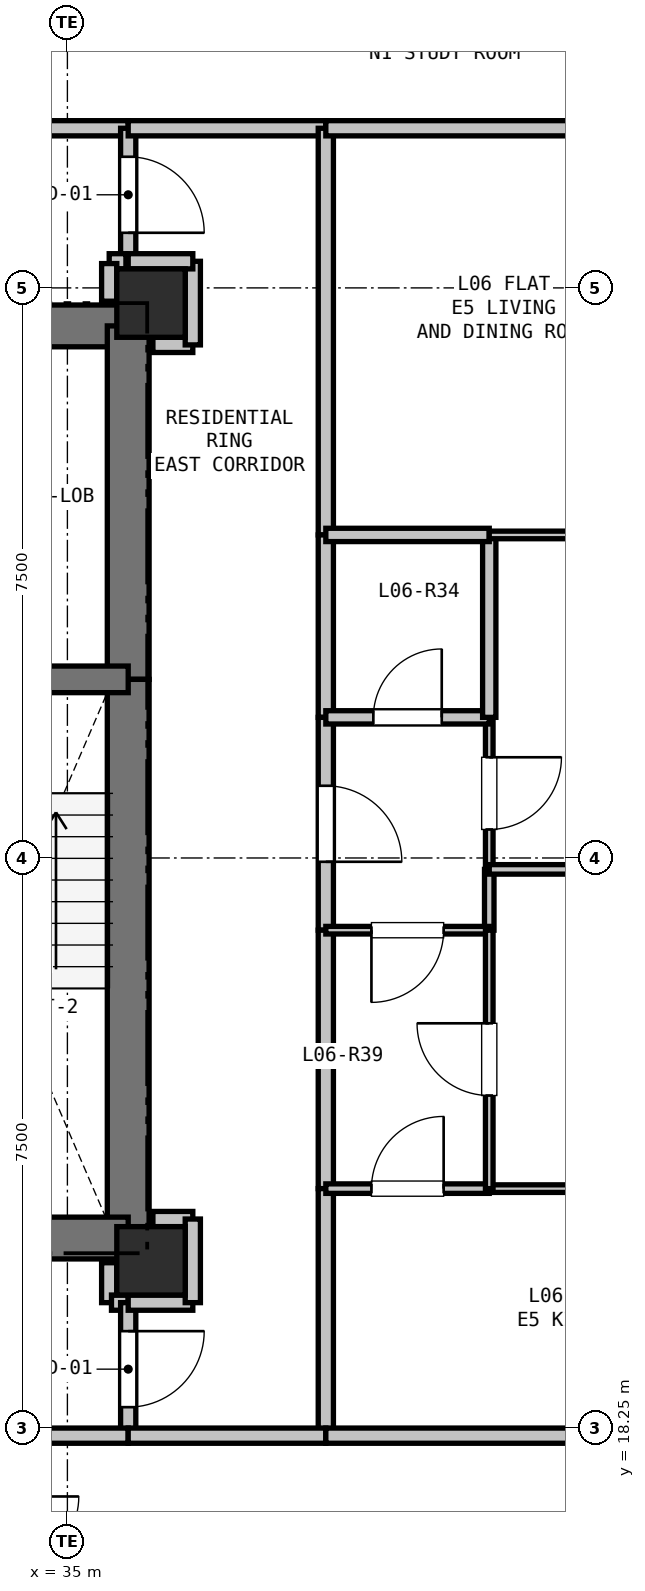
"""IFC4 building model, lengths in metres.
Left out: names, types, materials, properties, quantities, classifications, styles, units other than length and angle.
Written with IfcOpenShell. Run it as: python <this file> out.ifc"""

import sys

from ifc_helpers import new_model, si_unit, direction, frame, frame_2d, origin, origin_2d, place, context, subcontext, project, spatial, rectangle, extrude, element, fill, save


model = new_model("IFC4")
c1 = context("Model", 3, precision=1e-05, world=origin(), true_north=direction((0.0, 1.0)))
c2 = subcontext(c1, "Body", "Model", "MODEL_VIEW")
j1 = project(units=[si_unit("LENGTHUNIT", "METRE"), si_unit("PLANEANGLEUNIT", "RADIAN")], contexts=[c1])
p1 = place(None, origin())
s1 = spatial("IfcSite", under=j1, at=p1, CompositionType="ELEMENT")
p2 = place(p1, origin())
s2 = spatial("IfcBuilding", under=s1, at=p2, CompositionType="ELEMENT")
p3 = place(p2, frame((0.0, 0.0, 25.8)))
s3 = spatial("IfcBuildingStorey", under=s2, at=p3, CompositionType="ELEMENT", Elevation=25.8)
for number, where, z_axis, x_axis in (
    (1, (36.1, 33.05, 0.0), (0.0, 0.0, 1.0), (1.0, 0.0, 0.0)),
    (2, (36.1, 20.45, 0.0), (0.0, 0.0, 1.0), (1.0, 0.0, 0.0)),
):
    element("IfcColumn", number, at=place(p3, frame(where, z_axis=z_axis, x_axis=x_axis)), inside=s3, PredefinedType="COLUMN", context=c2, shape_type="SweptSolid", body=[
        extrude(rectangle(XDim=0.9, YDim=0.9, at=origin_2d()), origin(), (0.0, 0.0, 1.0), 3.3),
    ])
p4 = place(p3, frame((32.35, 32.75, 0.0), z_axis=(0.0, 0.0, 1.0), x_axis=(1.0, 0.0, 0.0)))
e3 = element("IfcWall", 3, at=p4, inside=s3, PredefinedType="SHEAR", context=c2, shape_type="SweptSolid", body=[
    extrude(rectangle(XDim=3.45, YDim=0.55, at=frame_2d((1.725, 0.0))), origin(), (0.0, 0.0, 1.0), 3.04),
])
p5 = place(p4, frame((0.65, 0.0, 0.0)))
e4 = element("IfcOpeningElement", 4, at=p5, cuts=e3, PredefinedType="OPENING", context=c2, shape_type="SweptSolid", body=[
    extrude(rectangle(XDim=1.15, YDim=2.15, at=frame_2d((0.575, 1.075))), frame((0.0, 0.285, 0.0), z_axis=(0.0, -1.0, 0.0), x_axis=(1.0, 0.0, 0.0)), (0.0, 0.0, 1.0), 0.57),
])
p6 = place(p3, frame((35.8, 32.75, 0.0), z_axis=(0.0, 0.0, 1.0), x_axis=(0.0, -1.0, 0.0)))
e5 = element("IfcWall", 5, at=p6, inside=s3, PredefinedType="SHEAR", context=c2, shape_type="SweptSolid", body=[
    extrude(rectangle(XDim=4.65, YDim=0.55, at=frame_2d((2.325, 0.0))), origin(), (0.0, 0.0, 1.0), 3.04),
])
p7 = place(p3, frame((35.8, 28.1, 0.0), z_axis=(0.0, 0.0, 1.0), x_axis=(0.0, -1.0, 0.0)))
e6 = element("IfcWall", 6, at=p7, inside=s3, PredefinedType="SHEAR", context=c2, shape_type="SweptSolid", body=[
    extrude(rectangle(XDim=7.35, YDim=0.55, at=frame_2d((3.675, 0.0))), origin(), (0.0, 0.0, 1.0), 3.04),
])
p8 = place(p3, frame((35.8, 20.75, 0.0), z_axis=(0.0, 0.0, 1.0), x_axis=(-1.0, 0.0, 0.0)))
e7 = element("IfcWall", 7, at=p8, inside=s3, PredefinedType="SHEAR", context=c2, shape_type="SweptSolid", body=[
    extrude(rectangle(XDim=3.45, YDim=0.55, at=frame_2d((1.725, 0.0))), origin(), (0.0, 0.0, 1.0), 3.04),
])
p9 = place(p3, frame((32.35, 28.1, 0.0), z_axis=(0.0, 0.0, 1.0), x_axis=(1.0, 0.0, 0.0)))
e8 = element("IfcWall", 8, at=p9, inside=s3, PredefinedType="SHEAR", context=c2, shape_type="SweptSolid", body=[
    extrude(rectangle(XDim=3.45, YDim=0.35, at=frame_2d((1.725, 0.0))), origin(), (0.0, 0.0, 1.0), 3.04),
])
p10 = place(p9, frame((1.15, 0.0, 0.0)))
e9 = element("IfcOpeningElement", 9, at=p10, cuts=e8, PredefinedType="OPENING", context=c2, shape_type="SweptSolid", body=[
    extrude(rectangle(XDim=1.15, YDim=2.15, at=frame_2d((0.575, 1.075))), frame((0.0, 0.185, 0.0), z_axis=(0.0, -1.0, 0.0), x_axis=(1.0, 0.0, 0.0)), (0.0, 0.0, 1.0), 0.37),
])
p11 = place(p3, frame((35.55, 20.425, 0.0), z_axis=(0.0, 0.0, 1.0), x_axis=(0.0, -1.0, 0.0)))
e10 = element("IfcWall", 10, at=p11, inside=s3, PredefinedType="PARTITIONING", context=c2, shape_type="SweptSolid", body=[
    extrude(rectangle(XDim=0.525, YDim=0.2, at=frame_2d((0.263, 0.0))), origin(), (0.0, 0.0, 1.0), 2.488),
])
p12 = place(p3, frame((35.58, 19.9, 0.0), z_axis=(0.0, 0.0, 1.0), x_axis=(1.0, 0.0, 0.0)))
e11 = element("IfcWall", 11, at=p12, inside=s3, PredefinedType="PARTITIONING", context=c2, shape_type="SweptSolid", body=[
    extrude(rectangle(XDim=0.22, YDim=0.2, at=frame_2d((0.11, 0.0))), origin(), (0.0, 0.0, 1.0), 3.04),
])
p13 = place(p3, frame((35.8, 19.9, 0.0), z_axis=(0.0, 0.0, 1.0), x_axis=(0.0, -1.0, 0.0)))
e12 = element("IfcWall", 12, at=p13, inside=s3, PredefinedType="PARTITIONING", context=c2, shape_type="SweptSolid", body=[
    extrude(rectangle(XDim=1.75, YDim=0.2, at=frame_2d((0.875, 0.0))), origin(), (0.0, 0.0, 1.0), 3.04),
])
p14 = place(p13, frame((0.375, 0.0, 0.0)))
e13 = element("IfcOpeningElement", 13, at=p14, cuts=e12, PredefinedType="OPENING", context=c2, shape_type="SweptSolid", body=[
    extrude(rectangle(XDim=1.0, YDim=2.15, at=frame_2d((0.5, 1.075))), frame((0.0, 0.11, 0.0), z_axis=(0.0, -1.0, 0.0), x_axis=(1.0, 0.0, 0.0)), (0.0, 0.0, 1.0), 0.22),
])
p15 = place(p3, frame((35.8, 18.15, 0.0), z_axis=(0.0, 0.0, 1.0), x_axis=(-1.0, 0.0, 0.0)))
e14 = element("IfcWall", 14, at=p15, inside=s3, PredefinedType="PARTITIONING", context=c2, shape_type="SweptSolid", body=[
    extrude(rectangle(XDim=1.6, YDim=0.2, at=frame_2d((0.8, 0.0))), origin(), (0.0, 0.0, 1.0), 3.04),
])
p16 = place(p3, frame((34.0, 35.35, 0.0), z_axis=(0.0, 0.0, 1.0), x_axis=(1.0, 0.0, 0.0)))
e15 = element("IfcWall", 15, at=p16, inside=s3, PredefinedType="PARTITIONING", context=c2, shape_type="SweptSolid", body=[
    extrude(rectangle(XDim=1.8, YDim=0.2, at=frame_2d((0.9, 0.0))), origin(), (0.0, 0.0, 1.0), 3.04),
])
p17 = place(p3, frame((35.8, 35.35, 0.0), z_axis=(0.0, 0.0, 1.0), x_axis=(0.0, -1.0, 0.0)))
e16 = element("IfcWall", 16, at=p17, inside=s3, PredefinedType="PARTITIONING", context=c2, shape_type="SweptSolid", body=[
    extrude(rectangle(XDim=1.75, YDim=0.2, at=frame_2d((0.875, 0.0))), origin(), (0.0, 0.0, 1.0), 3.04),
])
p18 = place(p17, frame((0.375, 0.0, 0.0)))
e17 = element("IfcOpeningElement", 17, at=p18, cuts=e16, PredefinedType="OPENING", context=c2, shape_type="SweptSolid", body=[
    extrude(rectangle(XDim=1.0, YDim=2.15, at=frame_2d((0.5, 1.075))), frame((0.0, 0.11, 0.0), z_axis=(0.0, -1.0, 0.0), x_axis=(1.0, 0.0, 0.0)), (0.0, 0.0, 1.0), 0.22),
])
p19 = place(p3, frame((35.77, 33.6, 0.0), z_axis=(0.0, 0.0, 1.0), x_axis=(-1.0, 0.0, 0.0)))
e18 = element("IfcWall", 18, at=p19, inside=s3, PredefinedType="PARTITIONING", context=c2, shape_type="SweptSolid", body=[
    extrude(rectangle(XDim=0.22, YDim=0.2, at=frame_2d((0.11, 0.0))), origin(), (0.0, 0.0, 1.0), 3.04),
])
p20 = place(p3, frame((35.55, 33.57, 0.0), z_axis=(0.0, 0.0, 1.0), x_axis=(0.0, -1.0, 0.0)))
e19 = element("IfcWall", 19, at=p20, inside=s3, PredefinedType="PARTITIONING", context=c2, shape_type="SweptSolid", body=[
    extrude(rectangle(XDim=0.495, YDim=0.2, at=frame_2d((0.248, 0.0))), origin(), (0.0, 0.0, 1.0), 2.488),
])
for number, where, z_axis, x_axis in (
    (20, (36.65, 21.0, 0.0), (0.0, 0.0, 1.0), (-1.0, 0.0, 0.0)),
    (21, (36.125, 32.5, 0.0), (0.0, 0.0, 1.0), (1.0, 0.0, 0.0)),
):
    element("IfcWall", number, at=place(p3, frame(where, z_axis=z_axis, x_axis=x_axis)), inside=s3, PredefinedType="PARTITIONING", context=c2, shape_type="SweptSolid", body=[
        extrude(rectangle(XDim=0.525, YDim=0.2, at=frame_2d((0.262, 0.0))), origin(), (0.0, 0.0, 1.0), 2.488),
    ])
p21 = place(p3, frame((36.65, 32.5, 0.0), z_axis=(0.0, 0.0, 1.0), x_axis=(0.0, 1.0, 0.0)))
e22 = element("IfcWall", 22, at=p21, inside=s3, PredefinedType="PARTITIONING", context=c2, shape_type="SweptSolid", body=[
    extrude(rectangle(XDim=1.1, YDim=0.2, at=frame_2d((0.55, 0.0))), origin(), (0.0, 0.0, 1.0), 2.337),
])
p22 = place(p3, frame((36.65, 33.6, 0.0), z_axis=(0.0, 0.0, 1.0), x_axis=(-1.0, 0.0, 0.0)))
e23 = element("IfcWall", 23, at=p22, inside=s3, PredefinedType="PARTITIONING", context=c2, shape_type="SweptSolid", body=[
    extrude(rectangle(XDim=0.85, YDim=0.2, at=frame_2d((0.425, 0.0))), origin(), (0.0, 0.0, 1.0), 2.337),
])
p23 = place(p3, frame((35.8, 35.35, 0.0), z_axis=(0.0, 0.0, 1.0), x_axis=(1.0, 0.0, 0.0)))
e24 = element("IfcWall", 24, at=p23, inside=s3, PredefinedType="PARTITIONING", context=c2, shape_type="SweptSolid", body=[
    extrude(rectangle(XDim=2.6, YDim=0.2, at=frame_2d((1.3, 0.0))), origin(), (0.0, 0.0, 1.0), 2.337),
])
p24 = place(p3, frame((38.4, 35.35, 0.0), z_axis=(0.0, 0.0, 1.0), x_axis=(0.0, -1.0, 0.0)))
e25 = element("IfcWall", 25, at=p24, inside=s3, PredefinedType="PARTITIONING", context=c2, shape_type="SweptSolid", body=[
    extrude(rectangle(XDim=5.35, YDim=0.2, at=frame_2d((2.675, 0.0))), origin(), (0.0, 0.0, 1.0), 2.337),
])
p25 = place(p3, frame((38.4, 30.0, 0.0), z_axis=(0.0, 0.0, 1.0), x_axis=(0.0, -1.0, 0.0)))
e26 = element("IfcWall", 26, at=p25, inside=s3, PredefinedType="PARTITIONING", context=c2, shape_type="SweptSolid", body=[
    extrude(rectangle(XDim=2.4, YDim=0.2, at=frame_2d((1.2, 0.0))), origin(), (0.0, 0.0, 1.0), 3.04),
])
p26 = place(p3, frame((38.4, 27.6, 0.0), z_axis=(0.0, 0.0, 1.0), x_axis=(0.0, -1.0, 0.0)))
e27 = element("IfcWall", 27, at=p26, inside=s3, PredefinedType="PARTITIONING", context=c2, shape_type="SweptSolid", body=[
    extrude(rectangle(XDim=2.8, YDim=0.2, at=frame_2d((1.4, 0.0))), origin(), (0.0, 0.0, 1.0), 3.04),
])
p27 = place(p26, frame((0.9, 0.0, 0.0)))
e28 = element("IfcOpeningElement", 28, at=p27, cuts=e27, PredefinedType="OPENING", context=c2, shape_type="SweptSolid", body=[
    extrude(rectangle(XDim=1.0, YDim=2.15, at=frame_2d((0.5, 1.075))), frame((0.0, 0.11, 0.0), z_axis=(0.0, -1.0, 0.0), x_axis=(1.0, 0.0, 0.0)), (0.0, 0.0, 1.0), 0.22),
])
p28 = place(p3, frame((38.4, 24.8, 0.0), z_axis=(0.0, 0.0, 1.0), x_axis=(0.0, -1.0, 0.0)))
e29 = element("IfcWall", 29, at=p28, inside=s3, PredefinedType="PARTITIONING", context=c2, shape_type="SweptSolid", body=[
    extrude(rectangle(XDim=3.4, YDim=0.2, at=frame_2d((1.7, 0.0))), origin(), (0.0, 0.0, 1.0), 3.04),
])
p29 = place(p3, frame((38.4, 21.4, 0.0), z_axis=(0.0, 0.0, 1.0), x_axis=(0.0, -1.0, 0.0)))
e30 = element("IfcWall", 30, at=p29, inside=s3, PredefinedType="PARTITIONING", context=c2, shape_type="SweptSolid", body=[
    extrude(rectangle(XDim=3.25, YDim=0.2, at=frame_2d((1.625, 0.0))), origin(), (0.0, 0.0, 1.0), 3.04),
])
p30 = place(p3, frame((38.4, 18.15, 0.0), z_axis=(0.0, 0.0, 1.0), x_axis=(-1.0, 0.0, 0.0)))
e31 = element("IfcWall", 31, at=p30, inside=s3, PredefinedType="PARTITIONING", context=c2, shape_type="SweptSolid", body=[
    extrude(rectangle(XDim=2.6, YDim=0.2, at=frame_2d((1.3, 0.0))), origin(), (0.0, 0.0, 1.0), 2.337),
])
p31 = place(p3, frame((35.8, 19.9, 0.0), z_axis=(0.0, 0.0, 1.0), x_axis=(1.0, 0.0, 0.0)))
e32 = element("IfcWall", 32, at=p31, inside=s3, PredefinedType="PARTITIONING", context=c2, shape_type="SweptSolid", body=[
    extrude(rectangle(XDim=0.85, YDim=0.2, at=frame_2d((0.425, 0.0))), origin(), (0.0, 0.0, 1.0), 2.337),
])
p32 = place(p3, frame((36.65, 19.9, 0.0), z_axis=(0.0, 0.0, 1.0), x_axis=(0.0, 1.0, 0.0)))
e33 = element("IfcWall", 33, at=p32, inside=s3, PredefinedType="PARTITIONING", context=c2, shape_type="SweptSolid", body=[
    extrude(rectangle(XDim=1.1, YDim=0.2, at=frame_2d((0.55, 0.0))), origin(), (0.0, 0.0, 1.0), 3.04),
])
p33 = place(p3, frame((40.55, 27.6, 0.0), z_axis=(0.0, 0.0, 1.0), x_axis=(0.0, -1.0, 0.0)))
e34 = element("IfcWall", 34, at=p33, inside=s3, PredefinedType="PARTITIONING", context=c2, shape_type="SweptSolid", body=[
    extrude(rectangle(XDim=2.0, YDim=0.1, at=frame_2d((1.0, 0.0))), origin(), (0.0, 0.0, 1.0), 3.04),
])
p34 = place(p33, frame((0.525, 0.0, 0.0)))
e35 = element("IfcOpeningElement", 35, at=p34, cuts=e34, PredefinedType="OPENING", context=c2, shape_type="SweptSolid", body=[
    extrude(rectangle(XDim=0.95, YDim=2.1, at=frame_2d((0.475, 1.05))), frame((0.0, 0.06, 0.0), z_axis=(0.0, -1.0, 0.0), x_axis=(1.0, 0.0, 0.0)), (0.0, 0.0, 1.0), 0.12),
])
p35 = place(p3, frame((40.55, 25.6, 0.0), z_axis=(0.0, 0.0, 1.0), x_axis=(0.0, -1.0, 0.0)))
e36 = element("IfcWall", 36, at=p35, inside=s3, PredefinedType="PARTITIONING", context=c2, shape_type="SweptSolid", body=[
    extrude(rectangle(XDim=0.8, YDim=0.125, at=frame_2d((0.4, 0.0))), origin(), (0.0, 0.0, 1.0), 3.04),
])
p36 = place(p3, frame((40.55, 24.8, 0.0), z_axis=(0.0, 0.0, 1.0), x_axis=(-1.0, 0.0, 0.0)))
e37 = element("IfcWall", 37, at=p36, inside=s3, PredefinedType="PARTITIONING", context=c2, shape_type="SweptSolid", body=[
    extrude(rectangle(XDim=2.15, YDim=0.1, at=frame_2d((1.075, 0.0))), origin(), (0.0, 0.0, 1.0), 3.04),
])
p37 = place(p36, frame((0.6, 0.0, 0.0)))
e38 = element("IfcOpeningElement", 38, at=p37, cuts=e37, PredefinedType="OPENING", context=c2, shape_type="SweptSolid", body=[
    extrude(rectangle(XDim=0.95, YDim=2.1, at=frame_2d((0.475, 1.05))), frame((0.0, 0.06, 0.0), z_axis=(0.0, -1.0, 0.0), x_axis=(1.0, 0.0, 0.0)), (0.0, 0.0, 1.0), 0.12),
])
p38 = place(p3, frame((38.4, 27.6, 0.0), z_axis=(0.0, 0.0, 1.0), x_axis=(1.0, 0.0, 0.0)))
e39 = element("IfcWall", 39, at=p38, inside=s3, PredefinedType="PLUMBINGWALL", context=c2, shape_type="SweptSolid", body=[
    extrude(rectangle(XDim=2.15, YDim=0.175, at=frame_2d((1.075, 0.0))), origin(), (0.0, 0.0, 1.0), 3.04),
])
p39 = place(p38, frame((0.625, 0.0, 0.0)))
e40 = element("IfcOpeningElement", 40, at=p39, cuts=e39, PredefinedType="OPENING", context=c2, shape_type="SweptSolid", body=[
    extrude(rectangle(XDim=0.9, YDim=2.1, at=frame_2d((0.45, 1.05))), frame((0.0, 0.097, 0.0), z_axis=(0.0, -1.0, 0.0), x_axis=(1.0, 0.0, 0.0)), (0.0, 0.0, 1.0), 0.195),
])
p40 = place(p3, frame((38.4, 18.15, 0.0), z_axis=(0.0, 0.0, 1.0), x_axis=(1.0, 0.0, 0.0)))
e41 = element("IfcWall", 41, at=p40, inside=s3, PredefinedType="PARTITIONING", context=c2, shape_type="SweptSolid", body=[
    extrude(rectangle(XDim=5.289, YDim=0.2, at=frame_2d((2.644, 0.0))), origin(), (0.0, 0.0, 1.0), 2.365),
])
p41 = place(p3, frame((40.55, 30.0, 0.0), z_axis=(0.0, 0.0, 1.0), x_axis=(0.0, -1.0, 0.0)))
e42 = element("IfcWall", 42, at=p41, inside=s3, PredefinedType="PLUMBINGWALL", context=c2, shape_type="SweptSolid", body=[
    extrude(rectangle(XDim=2.4, YDim=0.175, at=frame_2d((1.2, 0.0))), origin(), (0.0, 0.0, 1.0), 3.04),
])
p42 = place(p3, frame((38.4, 30.0, 0.0), z_axis=(0.0, 0.0, 1.0), x_axis=(1.0, 0.0, 0.0)))
e43 = element("IfcWall", 43, at=p42, inside=s3, PredefinedType="PLUMBINGWALL", context=c2, shape_type="SweptSolid", body=[
    extrude(rectangle(XDim=2.15, YDim=0.175, at=frame_2d((1.075, 0.0))), origin(), (0.0, 0.0, 1.0), 3.04),
])
p43 = place(p3, frame((38.4, 21.4, 0.0), z_axis=(0.0, 0.0, 1.0), x_axis=(1.0, 0.0, 0.0)))
e44 = element("IfcWall", 44, at=p43, inside=s3, PredefinedType="PARTITIONING", context=c2, shape_type="SweptSolid", body=[
    extrude(rectangle(XDim=2.15, YDim=0.125, at=frame_2d((1.075, 0.0))), origin(), (0.0, 0.0, 1.0), 3.04),
])
p44 = place(p43, frame((0.6, 0.0, 0.0)))
e45 = element("IfcOpeningElement", 45, at=p44, cuts=e44, PredefinedType="OPENING", context=c2, shape_type="SweptSolid", body=[
    extrude(rectangle(XDim=0.95, YDim=2.1, at=frame_2d((0.475, 1.05))), frame((0.0, 0.073, 0.0), z_axis=(0.0, -1.0, 0.0), x_axis=(1.0, 0.0, 0.0)), (0.0, 0.0, 1.0), 0.145),
])
p45 = place(p3, frame((40.55, 21.4, 0.0), z_axis=(0.0, 0.0, 1.0), x_axis=(1.0, 0.0, 0.0)))
e46 = element("IfcWall", 46, at=p45, inside=s3, PredefinedType="PARTITIONING", context=c2, shape_type="SweptSolid", body=[
    extrude(rectangle(XDim=3.264, YDim=0.1, at=frame_2d((1.632, 0.0))), origin(), (0.0, 0.0, 1.0), 2.365),
])
p46 = place(p3, frame((43.688, 35.35, 0.0), z_axis=(0.0, 0.0, 1.0), x_axis=(-1.0, 0.0, 0.0)))
e47 = element("IfcWall", 47, at=p46, inside=s3, PredefinedType="PARTITIONING", context=c2, shape_type="SweptSolid", body=[
    extrude(rectangle(XDim=5.289, YDim=0.2, at=frame_2d((2.644, 0.0))), origin(), (0.0, 0.0, 1.0), 2.337),
])
p47 = place(p3, frame((43.814, 30.0, 0.0), z_axis=(0.0, 0.0, 1.0), x_axis=(-1.0, 0.0, 0.0)))
e48 = element("IfcWall", 48, at=p47, inside=s3, PredefinedType="PARTITIONING", context=c2, shape_type="SweptSolid", body=[
    extrude(rectangle(XDim=3.264, YDim=0.1, at=frame_2d((1.632, 0.0))), origin(), (0.0, 0.0, 1.0), 2.365),
])
p48 = place(p47, frame((1.157, 0.0, 0.0)))
e49 = element("IfcOpeningElement", 49, at=p48, cuts=e48, PredefinedType="OPENING", context=c2, shape_type="SweptSolid", body=[
    extrude(rectangle(XDim=0.95, YDim=2.1, at=frame_2d((0.475, 1.05))), frame((0.0, 0.06, 0.0), z_axis=(0.0, -1.0, 0.0), x_axis=(1.0, 0.0, 0.0)), (0.0, 0.0, 1.0), 0.12),
])
p49 = place(p3, frame((43.814, 25.6, 0.0), z_axis=(0.0, 0.0, 1.0), x_axis=(-1.0, 0.0, 0.0)))
e50 = element("IfcWall", 50, at=p49, inside=s3, PredefinedType="PARTITIONING", context=c2, shape_type="SweptSolid", body=[
    extrude(rectangle(XDim=3.264, YDim=0.125, at=frame_2d((1.632, 0.0))), origin(), (0.0, 0.0, 1.0), 2.365),
])
p50 = place(p3, frame((40.55, 21.4, 0.0), z_axis=(0.0, 0.0, 1.0), x_axis=(0.0, 1.0, 0.0)))
e51 = element("IfcWall", 51, at=p50, inside=s3, PredefinedType="PARTITIONING", context=c2, shape_type="SweptSolid", body=[
    extrude(rectangle(XDim=3.4, YDim=0.1, at=frame_2d((1.7, 0.0))), origin(), (0.0, 0.0, 1.0), 3.04),
])
p51 = place(p50, frame((1.225, 0.0, 0.0)))
e52 = element("IfcOpeningElement", 52, at=p51, cuts=e51, PredefinedType="OPENING", context=c2, shape_type="SweptSolid", body=[
    extrude(rectangle(XDim=0.95, YDim=2.1, at=frame_2d((0.475, 1.05))), frame((0.0, 0.06, 0.0), z_axis=(0.0, -1.0, 0.0), x_axis=(1.0, 0.0, 0.0)), (0.0, 0.0, 1.0), 0.12),
])
p52 = place(p14, origin())
e53 = element("IfcDoor", 53, at=p52, inside=s3, OperationType="SINGLE_SWING_LEFT", PredefinedType="DOOR", context=c2, shape_type="SweptSolid", body=[
    extrude(rectangle(XDim=1.0, YDim=2.15, at=frame_2d((0.5, 1.075))), frame((0.0, 0.025, 0.0), z_axis=(0.0, -1.0, 0.0), x_axis=(1.0, 0.0, 0.0)), (0.0, 0.0, 1.0), 0.05),
])
fill(e13, e53)
p53 = place(p18, origin())
e54 = element("IfcDoor", 54, at=p53, inside=s3, OperationType="SINGLE_SWING_RIGHT", PredefinedType="DOOR", context=c2, shape_type="SweptSolid", body=[
    extrude(rectangle(XDim=1.0, YDim=2.15, at=frame_2d((0.5, 1.075))), frame((0.0, 0.025, 0.0), z_axis=(0.0, -1.0, 0.0), x_axis=(1.0, 0.0, 0.0)), (0.0, 0.0, 1.0), 0.05),
])
fill(e17, e54)
p54 = place(p27, origin())
e55 = element("IfcDoor", 55, at=p54, inside=s3, OperationType="SINGLE_SWING_RIGHT", PredefinedType="DOOR", context=c2, shape_type="SweptSolid", body=[
    extrude(rectangle(XDim=1.0, YDim=2.15, at=frame_2d((0.5, 1.075))), frame((0.0, 0.025, 0.0), z_axis=(0.0, -1.0, 0.0), x_axis=(1.0, 0.0, 0.0)), (0.0, 0.0, 1.0), 0.05),
])
fill(e28, e55)
p55 = place(p39, origin())
e56 = element("IfcDoor", 56, at=p55, inside=s3, OperationType="SINGLE_SWING_RIGHT", PredefinedType="DOOR", context=c2, shape_type="SweptSolid", body=[
    extrude(rectangle(XDim=0.9, YDim=2.1, at=frame_2d((0.45, 1.05))), frame((0.0, 0.025, 0.0), z_axis=(0.0, -1.0, 0.0), x_axis=(1.0, 0.0, 0.0)), (0.0, 0.0, 1.0), 0.05),
])
fill(e40, e56)
p56 = place(p34, origin())
e57 = element("IfcDoor", 57, at=p56, inside=s3, OperationType="SINGLE_SWING_LEFT", PredefinedType="DOOR", context=c2, shape_type="SweptSolid", body=[
    extrude(rectangle(XDim=0.95, YDim=2.1, at=frame_2d((0.475, 1.05))), frame((0.0, 0.025, 0.0), z_axis=(0.0, -1.0, 0.0), x_axis=(1.0, 0.0, 0.0)), (0.0, 0.0, 1.0), 0.05),
])
fill(e35, e57)
p57 = place(p37, origin())
e58 = element("IfcDoor", 58, at=p57, inside=s3, OperationType="SINGLE_SWING_RIGHT", PredefinedType="DOOR", context=c2, shape_type="SweptSolid", body=[
    extrude(rectangle(XDim=0.95, YDim=2.1, at=frame_2d((0.475, 1.05))), frame((0.0, 0.025, 0.0), z_axis=(0.0, -1.0, 0.0), x_axis=(1.0, 0.0, 0.0)), (0.0, 0.0, 1.0), 0.05),
])
fill(e38, e58)
p58 = place(p44, origin())
e59 = element("IfcDoor", 59, at=p58, inside=s3, OperationType="SINGLE_SWING_RIGHT", PredefinedType="DOOR", context=c2, shape_type="SweptSolid", body=[
    extrude(rectangle(XDim=0.95, YDim=2.1, at=frame_2d((0.475, 1.05))), frame((0.0, 0.025, 0.0), z_axis=(0.0, -1.0, 0.0), x_axis=(1.0, 0.0, 0.0)), (0.0, 0.0, 1.0), 0.05),
])
fill(e45, e59)
p59 = place(p51, origin())
e60 = element("IfcDoor", 60, at=p59, inside=s3, OperationType="SINGLE_SWING_RIGHT", PredefinedType="DOOR", context=c2, shape_type="SweptSolid", body=[
    extrude(rectangle(XDim=0.95, YDim=2.1, at=frame_2d((0.475, 1.05))), frame((0.0, 0.025, 0.0), z_axis=(0.0, -1.0, 0.0), x_axis=(1.0, 0.0, 0.0)), (0.0, 0.0, 1.0), 0.05),
])
fill(e52, e60)
save(model, sys.argv[1])
